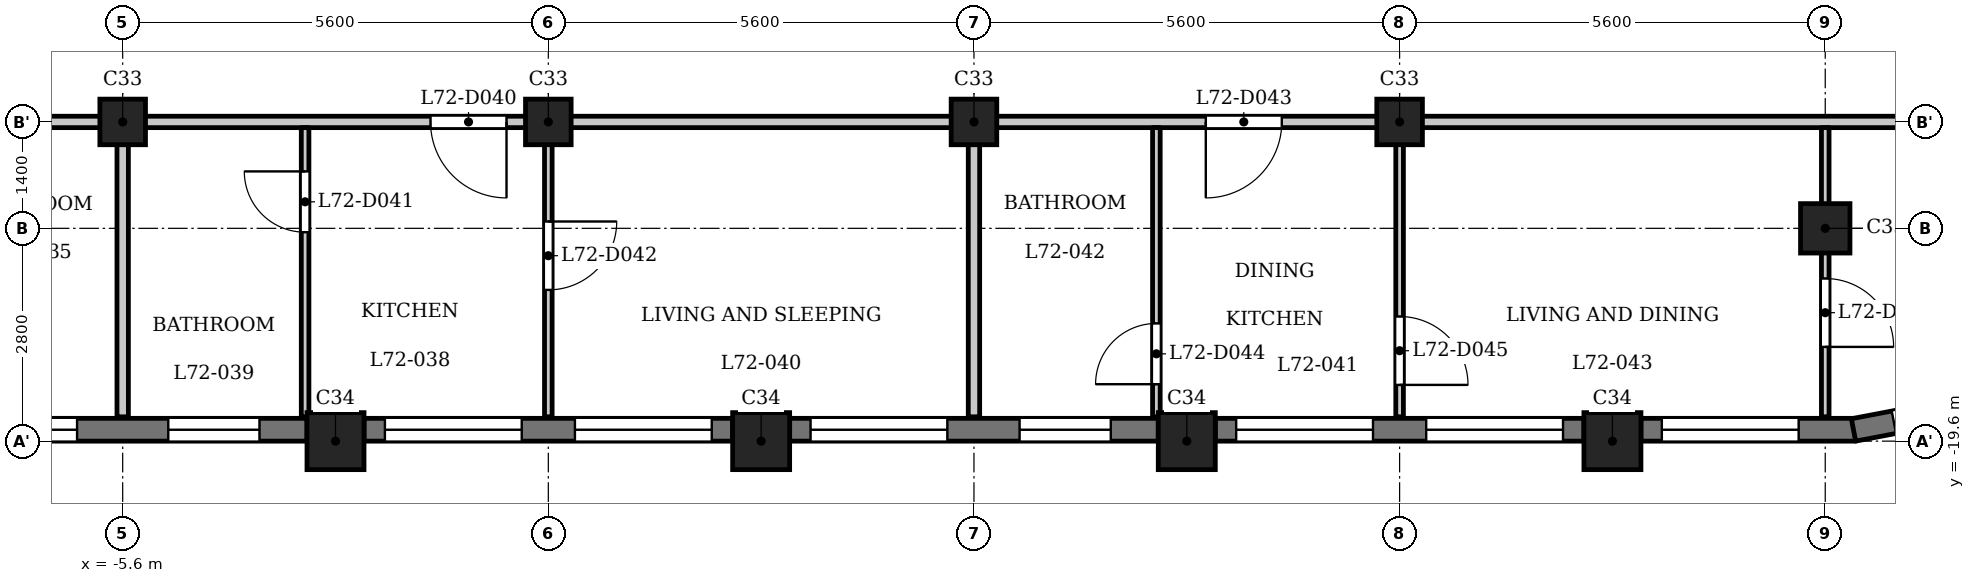
"""IFC4 building model, lengths in metres.
Left out: names, types, materials, properties, quantities, classifications, styles, units other than length and angle.
Written with IfcOpenShell. Run it as: python <this file> out.ifc"""

import sys

from ifc_helpers import new_model, si_unit, direction, frame, frame_2d, origin, origin_2d, place, context, subcontext, project, spatial, rectangle, extrude, element, fill, save


model = new_model("IFC4")
c1 = context("Model", 3, precision=1e-05, world=origin(), true_north=direction((0.0, 1.0)))
c2 = subcontext(c1, "Body", "Model", "MODEL_VIEW")
j1 = project(units=[si_unit("LENGTHUNIT", "METRE"), si_unit("PLANEANGLEUNIT", "RADIAN")], contexts=[c1])
p1 = place(None, origin())
s1 = spatial("IfcSite", under=j1, at=p1, CompositionType="ELEMENT")
p2 = place(p1, origin())
s2 = spatial("IfcBuilding", under=s1, at=p2, CompositionType="ELEMENT")
p3 = place(p2, frame((0.0, 0.0, 276.7)))
s3 = spatial("IfcBuildingStorey", under=s2, at=p3, CompositionType="ELEMENT", Elevation=276.7)
for number, where, z_axis, x_axis in (
    (1, (-2.8, -19.6, 0.0), (0.0, 0.0, 1.0), (1.0, 0.0, 0.0)),
    (2, (2.8, -19.6, 0.0), (0.0, 0.0, 1.0), (1.0, 0.0, 0.0)),
    (3, (8.4, -19.6, 0.0), (0.0, 0.0, 1.0), (1.0, 0.0, 0.0)),
    (4, (14.0, -19.6, 0.0), (0.0, 0.0, 1.0), (1.0, 0.0, 0.0)),
):
    element("IfcColumn", number, at=place(p3, frame(where, z_axis=z_axis, x_axis=x_axis)), inside=s3, PredefinedType="COLUMN", context=c2, shape_type="SweptSolid", body=[
        extrude(rectangle(XDim=0.75, YDim=0.75, at=origin_2d()), origin(), (0.0, 0.0, 1.0), 3.5),
    ])
p4 = place(p3, frame((16.8, -16.8, 0.0), z_axis=(0.0, 0.0, 1.0), x_axis=(1.0, 0.0, 0.0)))
e5 = element("IfcColumn", 5, at=p4, inside=s3, PredefinedType="COLUMN", context=c2, shape_type="SweptSolid", body=[
    extrude(rectangle(XDim=0.65, YDim=0.65, at=origin_2d()), origin(), (0.0, 0.0, 1.0), 3.5),
])
for number, where, z_axis, x_axis in (
    (6, (-5.6, -15.4, 0.0), (0.0, 0.0, 1.0), (1.0, 0.0, 0.0)),
    (7, (0.0, -15.4, 0.0), (0.0, 0.0, 1.0), (1.0, 0.0, 0.0)),
    (8, (5.6, -15.4, 0.0), (0.0, 0.0, 1.0), (1.0, 0.0, 0.0)),
    (9, (11.2, -15.4, 0.0), (0.0, 0.0, 1.0), (1.0, 0.0, 0.0)),
):
    element("IfcColumn", number, at=place(p3, frame(where, z_axis=z_axis, x_axis=x_axis)), inside=s3, PredefinedType="COLUMN", context=c2, shape_type="SweptSolid", body=[
        extrude(rectangle(XDim=0.6, YDim=0.6, at=origin_2d()), origin(), (0.0, 0.0, 1.0), 3.5),
    ])
p5 = place(p3, frame((-8.025, -19.45, 0.0), z_axis=(0.0, 0.0, 1.0), x_axis=(1.0, 0.0, 0.0)))
e10 = element("IfcWall", 10, at=p5, inside=s3, PredefinedType="SOLIDWALL", context=c2, shape_type="SweptSolid", body=[
    extrude(rectangle(XDim=4.85, YDim=0.3, at=frame_2d((2.425, 0.0))), origin(), (0.0, 0.0, 1.0), 2.55),
])
p6 = place(p5, frame((0.625, 0.0, 0.6)))
e11 = element("IfcOpeningElement", 11, at=p6, cuts=e10, PredefinedType="OPENING", context=c2, shape_type="SweptSolid", body=[
    extrude(rectangle(XDim=1.2, YDim=1.55, at=frame_2d((0.6, 0.775))), frame((0.0, 0.16, 0.0), z_axis=(0.0, -1.0, 0.0), x_axis=(1.0, 0.0, 0.0)), (0.0, 0.0, 1.0), 0.32),
])
p7 = place(p5, frame((3.025, 0.0, 0.6)))
e12 = element("IfcOpeningElement", 12, at=p7, cuts=e10, PredefinedType="OPENING", context=c2, shape_type="SweptSolid", body=[
    extrude(rectangle(XDim=1.2, YDim=1.55, at=frame_2d((0.6, 0.775))), frame((0.0, 0.16, 0.0), z_axis=(0.0, -1.0, 0.0), x_axis=(1.0, 0.0, 0.0)), (0.0, 0.0, 1.0), 0.32),
])
p8 = place(p3, frame((-2.425, -19.45, 0.0), z_axis=(0.0, 0.0, 1.0), x_axis=(1.0, 0.0, 0.0)))
e13 = element("IfcWall", 13, at=p8, inside=s3, PredefinedType="SOLIDWALL", context=c2, shape_type="SweptSolid", body=[
    extrude(rectangle(XDim=4.85, YDim=0.3, at=frame_2d((2.425, 0.0))), origin(), (0.0, 0.0, 1.0), 2.55),
])
p9 = place(p8, frame((0.275, 0.0, 0.9)))
e14 = element("IfcOpeningElement", 14, at=p9, cuts=e13, PredefinedType="OPENING", context=c2, shape_type="SweptSolid", body=[
    extrude(rectangle(XDim=1.8, YDim=1.25, at=frame_2d((0.9, 0.625))), frame((0.0, 0.16, 0.0), z_axis=(0.0, -1.0, 0.0), x_axis=(1.0, 0.0, 0.0)), (0.0, 0.0, 1.0), 0.32),
])
p10 = place(p8, frame((2.775, 0.0, 0.9)))
e15 = element("IfcOpeningElement", 15, at=p10, cuts=e13, PredefinedType="OPENING", context=c2, shape_type="SweptSolid", body=[
    extrude(rectangle(XDim=1.8, YDim=1.25, at=frame_2d((0.9, 0.625))), frame((0.0, 0.16, 0.0), z_axis=(0.0, -1.0, 0.0), x_axis=(1.0, 0.0, 0.0)), (0.0, 0.0, 1.0), 0.32),
])
p11 = place(p3, frame((3.175, -19.45, 0.0), z_axis=(0.0, 0.0, 1.0), x_axis=(1.0, 0.0, 0.0)))
e16 = element("IfcWall", 16, at=p11, inside=s3, PredefinedType="SOLIDWALL", context=c2, shape_type="SweptSolid", body=[
    extrude(rectangle(XDim=4.85, YDim=0.3, at=frame_2d((2.425, 0.0))), origin(), (0.0, 0.0, 1.0), 2.55),
])
p12 = place(p11, frame((0.275, 0.0, 0.9)))
e17 = element("IfcOpeningElement", 17, at=p12, cuts=e16, PredefinedType="OPENING", context=c2, shape_type="SweptSolid", body=[
    extrude(rectangle(XDim=1.8, YDim=1.25, at=frame_2d((0.9, 0.625))), frame((0.0, 0.16, 0.0), z_axis=(0.0, -1.0, 0.0), x_axis=(1.0, 0.0, 0.0)), (0.0, 0.0, 1.0), 0.32),
])
p13 = place(p11, frame((3.025, 0.0, 0.6)))
e18 = element("IfcOpeningElement", 18, at=p13, cuts=e16, PredefinedType="OPENING", context=c2, shape_type="SweptSolid", body=[
    extrude(rectangle(XDim=1.2, YDim=1.55, at=frame_2d((0.6, 0.775))), frame((0.0, 0.16, 0.0), z_axis=(0.0, -1.0, 0.0), x_axis=(1.0, 0.0, 0.0)), (0.0, 0.0, 1.0), 0.32),
])
p14 = place(p3, frame((8.775, -19.45, 0.0), z_axis=(0.0, 0.0, 1.0), x_axis=(1.0, 0.0, 0.0)))
e19 = element("IfcWall", 19, at=p14, inside=s3, PredefinedType="SOLIDWALL", context=c2, shape_type="SweptSolid", body=[
    extrude(rectangle(XDim=4.85, YDim=0.3, at=frame_2d((2.425, 0.0))), origin(), (0.0, 0.0, 1.0), 2.55),
])
p15 = place(p14, frame((0.275, 0.0, 0.9)))
e20 = element("IfcOpeningElement", 20, at=p15, cuts=e19, PredefinedType="OPENING", context=c2, shape_type="SweptSolid", body=[
    extrude(rectangle(XDim=1.8, YDim=1.25, at=frame_2d((0.9, 0.625))), frame((0.0, 0.16, 0.0), z_axis=(0.0, -1.0, 0.0), x_axis=(1.0, 0.0, 0.0)), (0.0, 0.0, 1.0), 0.32),
])
p16 = place(p14, frame((2.775, 0.0, 0.9)))
e21 = element("IfcOpeningElement", 21, at=p16, cuts=e19, PredefinedType="OPENING", context=c2, shape_type="SweptSolid", body=[
    extrude(rectangle(XDim=1.8, YDim=1.25, at=frame_2d((0.9, 0.625))), frame((0.0, 0.16, 0.0), z_axis=(0.0, -1.0, 0.0), x_axis=(1.0, 0.0, 0.0)), (0.0, 0.0, 1.0), 0.32),
])
p17 = place(p3, frame((14.375, -19.45, 0.0), z_axis=(0.0, 0.0, 1.0), x_axis=(1.0, 0.0, 0.0)))
e22 = element("IfcWall", 22, at=p17, inside=s3, PredefinedType="SOLIDWALL", context=c2, shape_type="SweptSolid", body=[
    extrude(rectangle(XDim=2.825, YDim=0.3, at=frame_2d((1.413, 0.0))), origin(), (0.0, 0.0, 1.0), 2.55),
])
p18 = place(p17, frame((0.275, 0.0, 0.9)))
e23 = element("IfcOpeningElement", 23, at=p18, cuts=e22, PredefinedType="OPENING", context=c2, shape_type="SweptSolid", body=[
    extrude(rectangle(XDim=1.8, YDim=1.25, at=frame_2d((0.9, 0.625))), frame((0.0, 0.16, 0.0), z_axis=(0.0, -1.0, 0.0), x_axis=(1.0, 0.0, 0.0)), (0.0, 0.0, 1.0), 0.32),
])
p19 = place(p3, frame((17.172, -19.453, 0.0), z_axis=(0.0, 0.0, 1.0), x_axis=(0.982284001233, 0.187398348234, 0.0)))
e24 = element("IfcWall", 24, at=p19, inside=s3, PredefinedType="SOLIDWALL", context=c2, shape_type="SweptSolid", body=[
    extrude(rectangle(XDim=1.881, YDim=0.3, at=frame_2d((0.941, 0.0))), origin(), (0.0, 0.0, 1.0), 2.55),
])
p20 = place(p19, frame((0.541, 0.0, 0.6)))
e25 = element("IfcOpeningElement", 25, at=p20, cuts=e24, PredefinedType="OPENING", context=c2, shape_type="SweptSolid", body=[
    extrude(rectangle(XDim=0.8, YDim=1.55, at=frame_2d((0.4, 0.775))), frame((0.0, 0.16, 0.0), z_axis=(0.0, -1.0, 0.0), x_axis=(1.0, 0.0, 0.0)), (0.0, 0.0, 1.0), 0.32),
])
p21 = place(p3, frame((-23.322, -15.4, 0.0), z_axis=(0.0, 0.0, 1.0), x_axis=(1.0, 0.0, 0.0)))
e26 = element("IfcWall", 26, at=p21, inside=s3, PredefinedType="PARTITIONING", context=c2, shape_type="SweptSolid", body=[
    extrude(rectangle(XDim=46.872, YDim=0.15, at=frame_2d((23.436, 0.0))), origin(), (0.0, 0.0, 1.0), 3.2),
])
p22 = place(p21, frame((13.772, 0.0, 0.0)))
e27 = element("IfcOpeningElement", 27, at=p22, cuts=e26, PredefinedType="OPENING", context=c2, shape_type="SweptSolid", body=[
    extrude(rectangle(XDim=1.0, YDim=2.1, at=frame_2d((0.5, 1.05))), frame((0.0, 0.085, 0.0), z_axis=(0.0, -1.0, 0.0), x_axis=(1.0, 0.0, 0.0)), (0.0, 0.0, 1.0), 0.17),
])
p23 = place(p21, frame((21.772, 0.0, 0.0)))
e28 = element("IfcOpeningElement", 28, at=p23, cuts=e26, PredefinedType="OPENING", context=c2, shape_type="SweptSolid", body=[
    extrude(rectangle(XDim=1.0, YDim=2.1, at=frame_2d((0.5, 1.05))), frame((0.0, 0.085, 0.0), z_axis=(0.0, -1.0, 0.0), x_axis=(1.0, 0.0, 0.0)), (0.0, 0.0, 1.0), 0.17),
])
p24 = place(p21, frame((31.972, 0.0, 0.0)))
e29 = element("IfcOpeningElement", 29, at=p24, cuts=e26, PredefinedType="OPENING", context=c2, shape_type="SweptSolid", body=[
    extrude(rectangle(XDim=1.0, YDim=2.1, at=frame_2d((0.5, 1.05))), frame((0.0, 0.085, 0.0), z_axis=(0.0, -1.0, 0.0), x_axis=(1.0, 0.0, 0.0)), (0.0, 0.0, 1.0), 0.17),
])
p25 = place(p3, frame((-5.6, -19.28, 0.0), z_axis=(0.0, 0.0, 1.0), x_axis=(0.0, 1.0, 0.0)))
e30 = element("IfcWall", 30, at=p25, inside=s3, PredefinedType="PARTITIONING", context=c2, shape_type="SweptSolid", body=[
    extrude(rectangle(XDim=3.805, YDim=0.15, at=frame_2d((1.902, 0.0))), origin(), (0.0, 0.0, 1.0), 3.2),
])
p26 = place(p3, frame((-3.2, -19.28, 0.0), z_axis=(0.0, 0.0, 1.0), x_axis=(0.0, 1.0, 0.0)))
e31 = element("IfcWall", 31, at=p26, inside=s3, PredefinedType="PARTITIONING", context=c2, shape_type="SweptSolid", body=[
    extrude(rectangle(XDim=3.805, YDim=0.1, at=frame_2d((1.902, 0.0))), origin(), (0.0, 0.0, 1.0), 3.2),
])
p27 = place(p26, frame((2.429, 0.0, 0.0)))
e32 = element("IfcOpeningElement", 32, at=p27, cuts=e31, PredefinedType="OPENING", context=c2, shape_type="SweptSolid", body=[
    extrude(rectangle(XDim=0.8, YDim=2.1, at=frame_2d((0.4, 1.05))), frame((0.0, 0.06, 0.0), z_axis=(0.0, -1.0, 0.0), x_axis=(1.0, 0.0, 0.0)), (0.0, 0.0, 1.0), 0.12),
])
p28 = place(p3, frame((0.0, -19.28, 0.0), z_axis=(0.0, 0.0, 1.0), x_axis=(0.0, 1.0, 0.0)))
e33 = element("IfcWall", 33, at=p28, inside=s3, PredefinedType="PARTITIONING", context=c2, shape_type="SweptSolid", body=[
    extrude(rectangle(XDim=3.805, YDim=0.1, at=frame_2d((1.902, 0.0))), origin(), (0.0, 0.0, 1.0), 3.2),
])
p29 = place(p28, frame((1.67, 0.0, 0.0)))
e34 = element("IfcOpeningElement", 34, at=p29, cuts=e33, PredefinedType="OPENING", context=c2, shape_type="SweptSolid", body=[
    extrude(rectangle(XDim=0.9, YDim=2.1, at=frame_2d((0.45, 1.05))), frame((0.0, 0.06, 0.0), z_axis=(0.0, -1.0, 0.0), x_axis=(1.0, 0.0, 0.0)), (0.0, 0.0, 1.0), 0.12),
])
p30 = place(p3, frame((5.6, -19.28, 0.0), z_axis=(0.0, 0.0, 1.0), x_axis=(0.0, 1.0, 0.0)))
e35 = element("IfcWall", 35, at=p30, inside=s3, PredefinedType="PARTITIONING", context=c2, shape_type="SweptSolid", body=[
    extrude(rectangle(XDim=3.805, YDim=0.15, at=frame_2d((1.902, 0.0))), origin(), (0.0, 0.0, 1.0), 3.2),
])
p31 = place(p3, frame((8.0, -19.28, 0.0), z_axis=(0.0, 0.0, 1.0), x_axis=(0.0, 1.0, 0.0)))
e36 = element("IfcWall", 36, at=p31, inside=s3, PredefinedType="PARTITIONING", context=c2, shape_type="SweptSolid", body=[
    extrude(rectangle(XDim=3.805, YDim=0.1, at=frame_2d((1.902, 0.0))), origin(), (0.0, 0.0, 1.0), 3.2),
])
p32 = place(p31, frame((0.429, 0.0, 0.0)))
e37 = element("IfcOpeningElement", 37, at=p32, cuts=e36, PredefinedType="OPENING", context=c2, shape_type="SweptSolid", body=[
    extrude(rectangle(XDim=0.8, YDim=2.1, at=frame_2d((0.4, 1.05))), frame((0.0, 0.06, 0.0), z_axis=(0.0, -1.0, 0.0), x_axis=(1.0, 0.0, 0.0)), (0.0, 0.0, 1.0), 0.12),
])
p33 = place(p3, frame((11.2, -19.28, 0.0), z_axis=(0.0, 0.0, 1.0), x_axis=(0.0, 1.0, 0.0)))
e38 = element("IfcWall", 38, at=p33, inside=s3, PredefinedType="PARTITIONING", context=c2, shape_type="SweptSolid", body=[
    extrude(rectangle(XDim=3.805, YDim=0.1, at=frame_2d((1.902, 0.0))), origin(), (0.0, 0.0, 1.0), 3.2),
])
p34 = place(p33, frame((0.42, 0.0, 0.0)))
e39 = element("IfcOpeningElement", 39, at=p34, cuts=e38, PredefinedType="OPENING", context=c2, shape_type="SweptSolid", body=[
    extrude(rectangle(XDim=0.9, YDim=2.1, at=frame_2d((0.45, 1.05))), frame((0.0, 0.06, 0.0), z_axis=(0.0, -1.0, 0.0), x_axis=(1.0, 0.0, 0.0)), (0.0, 0.0, 1.0), 0.12),
])
p35 = place(p3, frame((16.8, -19.28, 0.0), z_axis=(0.0, 0.0, 1.0), x_axis=(0.0, 1.0, 0.0)))
e40 = element("IfcWall", 40, at=p35, inside=s3, PredefinedType="PARTITIONING", context=c2, shape_type="SweptSolid", body=[
    extrude(rectangle(XDim=3.805, YDim=0.1, at=frame_2d((1.902, 0.0))), origin(), (0.0, 0.0, 1.0), 3.2),
])
p36 = place(p35, frame((0.92, 0.0, 0.0)))
e41 = element("IfcOpeningElement", 41, at=p36, cuts=e40, PredefinedType="OPENING", context=c2, shape_type="SweptSolid", body=[
    extrude(rectangle(XDim=0.9, YDim=2.1, at=frame_2d((0.45, 1.05))), frame((0.0, 0.06, 0.0), z_axis=(0.0, -1.0, 0.0), x_axis=(1.0, 0.0, 0.0)), (0.0, 0.0, 1.0), 0.12),
])
p37 = place(p23, origin())
e42 = element("IfcDoor", 42, at=p37, inside=s3, OperationType="SINGLE_SWING_RIGHT", PredefinedType="DOOR", context=c2, shape_type="SweptSolid", body=[
    extrude(rectangle(XDim=1.0, YDim=2.1, at=frame_2d((0.5, 1.05))), frame((0.0, 0.025, 0.0), z_axis=(0.0, -1.0, 0.0), x_axis=(1.0, 0.0, 0.0)), (0.0, 0.0, 1.0), 0.05),
])
fill(e28, e42)
p38 = place(p27, origin())
e43 = element("IfcDoor", 43, at=p38, inside=s3, OperationType="SINGLE_SWING_LEFT", PredefinedType="DOOR", context=c2, shape_type="SweptSolid", body=[
    extrude(rectangle(XDim=0.8, YDim=2.1, at=frame_2d((0.4, 1.05))), frame((0.0, 0.025, 0.0), z_axis=(0.0, -1.0, 0.0), x_axis=(1.0, 0.0, 0.0)), (0.0, 0.0, 1.0), 0.05),
])
fill(e32, e43)
p39 = place(p29, origin())
e44 = element("IfcDoor", 44, at=p39, inside=s3, OperationType="SINGLE_SWING_RIGHT", PredefinedType="DOOR", context=c2, shape_type="SweptSolid", body=[
    extrude(rectangle(XDim=0.9, YDim=2.1, at=frame_2d((0.45, 1.05))), frame((0.0, 0.025, 0.0), z_axis=(0.0, -1.0, 0.0), x_axis=(1.0, 0.0, 0.0)), (0.0, 0.0, 1.0), 0.05),
])
fill(e34, e44)
p40 = place(p24, origin())
e45 = element("IfcDoor", 45, at=p40, inside=s3, OperationType="SINGLE_SWING_LEFT", PredefinedType="DOOR", context=c2, shape_type="SweptSolid", body=[
    extrude(rectangle(XDim=1.0, YDim=2.1, at=frame_2d((0.5, 1.05))), frame((0.0, 0.025, 0.0), z_axis=(0.0, -1.0, 0.0), x_axis=(1.0, 0.0, 0.0)), (0.0, 0.0, 1.0), 0.05),
])
fill(e29, e45)
p41 = place(p32, origin())
e46 = element("IfcDoor", 46, at=p41, inside=s3, OperationType="SINGLE_SWING_RIGHT", PredefinedType="DOOR", context=c2, shape_type="SweptSolid", body=[
    extrude(rectangle(XDim=0.8, YDim=2.1, at=frame_2d((0.4, 1.05))), frame((0.0, 0.025, 0.0), z_axis=(0.0, -1.0, 0.0), x_axis=(1.0, 0.0, 0.0)), (0.0, 0.0, 1.0), 0.05),
])
fill(e37, e46)
p42 = place(p34, origin())
e47 = element("IfcDoor", 47, at=p42, inside=s3, OperationType="SINGLE_SWING_LEFT", PredefinedType="DOOR", context=c2, shape_type="SweptSolid", body=[
    extrude(rectangle(XDim=0.9, YDim=2.1, at=frame_2d((0.45, 1.05))), frame((0.0, 0.025, 0.0), z_axis=(0.0, -1.0, 0.0), x_axis=(1.0, 0.0, 0.0)), (0.0, 0.0, 1.0), 0.05),
])
fill(e39, e47)
p43 = place(p36, origin())
e48 = element("IfcDoor", 48, at=p43, inside=s3, OperationType="SINGLE_SWING_LEFT", PredefinedType="DOOR", context=c2, shape_type="SweptSolid", body=[
    extrude(rectangle(XDim=0.9, YDim=2.1, at=frame_2d((0.45, 1.05))), frame((0.0, 0.025, 0.0), z_axis=(0.0, -1.0, 0.0), x_axis=(1.0, 0.0, 0.0)), (0.0, 0.0, 1.0), 0.05),
])
fill(e41, e48)
p44 = place(p6, origin())
e49 = element("IfcWindow", 49, at=p44, inside=s3, PartitioningType="SINGLE_PANEL", PredefinedType="WINDOW", context=c2, shape_type="SweptSolid", body=[
    extrude(rectangle(XDim=1.2, YDim=1.55, at=frame_2d((0.6, 0.775))), frame((0.0, 0.03, 0.0), z_axis=(0.0, -1.0, 0.0), x_axis=(1.0, 0.0, 0.0)), (0.0, 0.0, 1.0), 0.06),
])
fill(e11, e49)
p45 = place(p7, origin())
e50 = element("IfcWindow", 50, at=p45, inside=s3, PartitioningType="SINGLE_PANEL", PredefinedType="WINDOW", context=c2, shape_type="SweptSolid", body=[
    extrude(rectangle(XDim=1.2, YDim=1.55, at=frame_2d((0.6, 0.775))), frame((0.0, 0.03, 0.0), z_axis=(0.0, -1.0, 0.0), x_axis=(1.0, 0.0, 0.0)), (0.0, 0.0, 1.0), 0.06),
])
fill(e12, e50)
p46 = place(p9, origin())
e51 = element("IfcWindow", 51, at=p46, inside=s3, PartitioningType="SINGLE_PANEL", PredefinedType="WINDOW", context=c2, shape_type="SweptSolid", body=[
    extrude(rectangle(XDim=1.8, YDim=1.25, at=frame_2d((0.9, 0.625))), frame((0.0, 0.03, 0.0), z_axis=(0.0, -1.0, 0.0), x_axis=(1.0, 0.0, 0.0)), (0.0, 0.0, 1.0), 0.06),
])
fill(e14, e51)
p47 = place(p10, origin())
e52 = element("IfcWindow", 52, at=p47, inside=s3, PartitioningType="SINGLE_PANEL", PredefinedType="WINDOW", context=c2, shape_type="SweptSolid", body=[
    extrude(rectangle(XDim=1.8, YDim=1.25, at=frame_2d((0.9, 0.625))), frame((0.0, 0.03, 0.0), z_axis=(0.0, -1.0, 0.0), x_axis=(1.0, 0.0, 0.0)), (0.0, 0.0, 1.0), 0.06),
])
fill(e15, e52)
p48 = place(p12, origin())
e53 = element("IfcWindow", 53, at=p48, inside=s3, PartitioningType="SINGLE_PANEL", PredefinedType="WINDOW", context=c2, shape_type="SweptSolid", body=[
    extrude(rectangle(XDim=1.8, YDim=1.25, at=frame_2d((0.9, 0.625))), frame((0.0, 0.03, 0.0), z_axis=(0.0, -1.0, 0.0), x_axis=(1.0, 0.0, 0.0)), (0.0, 0.0, 1.0), 0.06),
])
fill(e17, e53)
p49 = place(p13, origin())
e54 = element("IfcWindow", 54, at=p49, inside=s3, PartitioningType="SINGLE_PANEL", PredefinedType="WINDOW", context=c2, shape_type="SweptSolid", body=[
    extrude(rectangle(XDim=1.2, YDim=1.55, at=frame_2d((0.6, 0.775))), frame((0.0, 0.03, 0.0), z_axis=(0.0, -1.0, 0.0), x_axis=(1.0, 0.0, 0.0)), (0.0, 0.0, 1.0), 0.06),
])
fill(e18, e54)
p50 = place(p15, origin())
e55 = element("IfcWindow", 55, at=p50, inside=s3, PartitioningType="SINGLE_PANEL", PredefinedType="WINDOW", context=c2, shape_type="SweptSolid", body=[
    extrude(rectangle(XDim=1.8, YDim=1.25, at=frame_2d((0.9, 0.625))), frame((0.0, 0.03, 0.0), z_axis=(0.0, -1.0, 0.0), x_axis=(1.0, 0.0, 0.0)), (0.0, 0.0, 1.0), 0.06),
])
fill(e20, e55)
p51 = place(p16, origin())
e56 = element("IfcWindow", 56, at=p51, inside=s3, PartitioningType="SINGLE_PANEL", PredefinedType="WINDOW", context=c2, shape_type="SweptSolid", body=[
    extrude(rectangle(XDim=1.8, YDim=1.25, at=frame_2d((0.9, 0.625))), frame((0.0, 0.03, 0.0), z_axis=(0.0, -1.0, 0.0), x_axis=(1.0, 0.0, 0.0)), (0.0, 0.0, 1.0), 0.06),
])
fill(e21, e56)
p52 = place(p18, origin())
e57 = element("IfcWindow", 57, at=p52, inside=s3, PartitioningType="SINGLE_PANEL", PredefinedType="WINDOW", context=c2, shape_type="SweptSolid", body=[
    extrude(rectangle(XDim=1.8, YDim=1.25, at=frame_2d((0.9, 0.625))), frame((0.0, 0.03, 0.0), z_axis=(0.0, -1.0, 0.0), x_axis=(1.0, 0.0, 0.0)), (0.0, 0.0, 1.0), 0.06),
])
fill(e23, e57)
p53 = place(p20, origin())
e58 = element("IfcWindow", 58, at=p53, inside=s3, PartitioningType="SINGLE_PANEL", PredefinedType="WINDOW", context=c2, shape_type="SweptSolid", body=[
    extrude(rectangle(XDim=0.8, YDim=1.55, at=frame_2d((0.4, 0.775))), frame((0.0, 0.03, 0.0), z_axis=(0.0, -1.0, 0.0), x_axis=(1.0, 0.0, 0.0)), (0.0, 0.0, 1.0), 0.06),
])
fill(e25, e58)
save(model, sys.argv[1])
